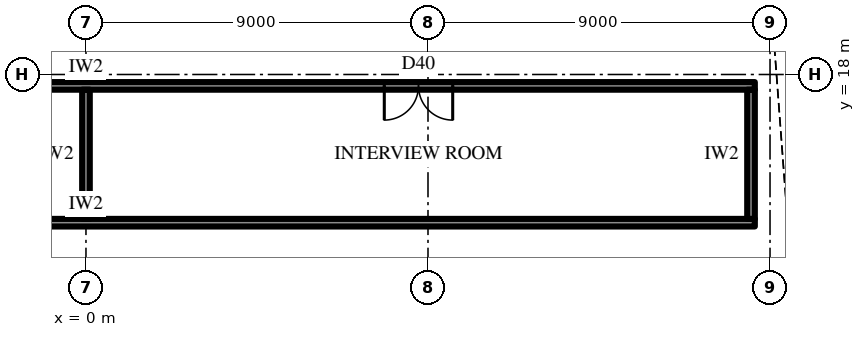
"""IFC4 building model, lengths in metres.
Left out: names, types, materials, properties, quantities, classifications, styles, units other than length and angle.
Written with IfcOpenShell. Run it as: python <this file> out.ifc"""

import sys

from ifc_helpers import new_model, si_unit, direction, frame, frame_2d, origin, place, context, subcontext, project, spatial, rectangle, extrude, element, fill, save


model = new_model("IFC4")
c1 = context("Model", 3, precision=1e-05, world=origin(), true_north=direction((0.0, 1.0)))
c2 = subcontext(c1, "Body", "Model", "MODEL_VIEW")
j1 = project(units=[si_unit("LENGTHUNIT", "METRE"), si_unit("PLANEANGLEUNIT", "RADIAN")], contexts=[c1])
p1 = place(None, origin())
s1 = spatial("IfcSite", under=j1, at=p1, CompositionType="ELEMENT")
p2 = place(p1, origin())
s2 = spatial("IfcBuilding", under=s1, at=p2, CompositionType="ELEMENT")
p3 = place(p2, frame((0.0, 0.0, 161.5)))
s3 = spatial("IfcBuildingStorey", under=s2, at=p3, CompositionType="ELEMENT", Elevation=161.5)
p4 = place(p3, frame((-17.6, 14.1, 0.0), z_axis=(0.0, 0.0, 1.0), x_axis=(1.0, 0.0, 0.0)))
e1 = element("IfcWall", 1, at=p4, inside=s3, PredefinedType="PARTITIONING", context=c2, shape_type="SweptSolid", body=[
    extrude(rectangle(XDim=35.2, YDim=0.2, at=frame_2d((17.6, 0.0))), origin(), (0.0, 0.0, 1.0), 4.0),
])
p5 = place(p3, frame((-17.6, 17.7, 0.0), z_axis=(0.0, 0.0, 1.0), x_axis=(1.0, 0.0, 0.0)))
e2 = element("IfcWall", 2, at=p5, inside=s3, PredefinedType="PARTITIONING", context=c2, shape_type="SweptSolid", body=[
    extrude(rectangle(XDim=35.2, YDim=0.2, at=frame_2d((17.6, 0.0))), origin(), (0.0, 0.0, 1.0), 4.0),
])
p6 = place(p5, frame((7.95, 0.0, 0.0)))
e3 = element("IfcOpeningElement", 3, at=p6, cuts=e2, PredefinedType="OPENING", context=c2, shape_type="SweptSolid", body=[
    extrude(rectangle(XDim=1.8, YDim=2.4, at=frame_2d((0.9, 1.2))), frame((0.0, 0.11, 0.0), z_axis=(0.0, -1.0, 0.0), x_axis=(1.0, 0.0, 0.0)), (0.0, 0.0, 1.0), 0.22),
])
p7 = place(p5, frame((25.45, 0.0, 0.0)))
e4 = element("IfcOpeningElement", 4, at=p7, cuts=e2, PredefinedType="OPENING", context=c2, shape_type="SweptSolid", body=[
    extrude(rectangle(XDim=1.8, YDim=2.4, at=frame_2d((0.9, 1.2))), frame((0.0, 0.11, 0.0), z_axis=(0.0, -1.0, 0.0), x_axis=(1.0, 0.0, 0.0)), (0.0, 0.0, 1.0), 0.22),
])
p8 = place(p3, frame((0.0, 14.2, 0.0), z_axis=(0.0, 0.0, 1.0), x_axis=(0.0, 1.0, 0.0)))
e5 = element("IfcWall", 5, at=p8, inside=s3, PredefinedType="PARTITIONING", context=c2, shape_type="SweptSolid", body=[
    extrude(rectangle(XDim=3.4, YDim=0.2, at=frame_2d((1.7, 0.0))), origin(), (0.0, 0.0, 1.0), 2.992),
])
p9 = place(p3, frame((17.5, 14.2, 0.0), z_axis=(0.0, 0.0, 1.0), x_axis=(0.0, 1.0, 0.0)))
e6 = element("IfcWall", 6, at=p9, inside=s3, PredefinedType="PARTITIONING", context=c2, shape_type="SweptSolid", body=[
    extrude(rectangle(XDim=3.4, YDim=0.2, at=frame_2d((1.7, 0.0))), origin(), (0.0, 0.0, 1.0), 4.0),
])
p10 = place(p7, frame((1.8, 0.0, 0.0), z_axis=(0.0, 0.0, 1.0), x_axis=(-1.0, 0.0, 0.0)))
e7 = element("IfcDoor", 7, at=p10, inside=s3, OperationType="DOUBLE_DOOR_SINGLE_SWING", PredefinedType="DOOR", context=c2, shape_type="SweptSolid", body=[
    extrude(rectangle(XDim=1.8, YDim=2.4, at=frame_2d((0.9, 1.2))), frame((0.0, 0.025, 0.0), z_axis=(0.0, -1.0, 0.0), x_axis=(1.0, 0.0, 0.0)), (0.0, 0.0, 1.0), 0.05),
])
fill(e4, e7)
save(model, sys.argv[1])
